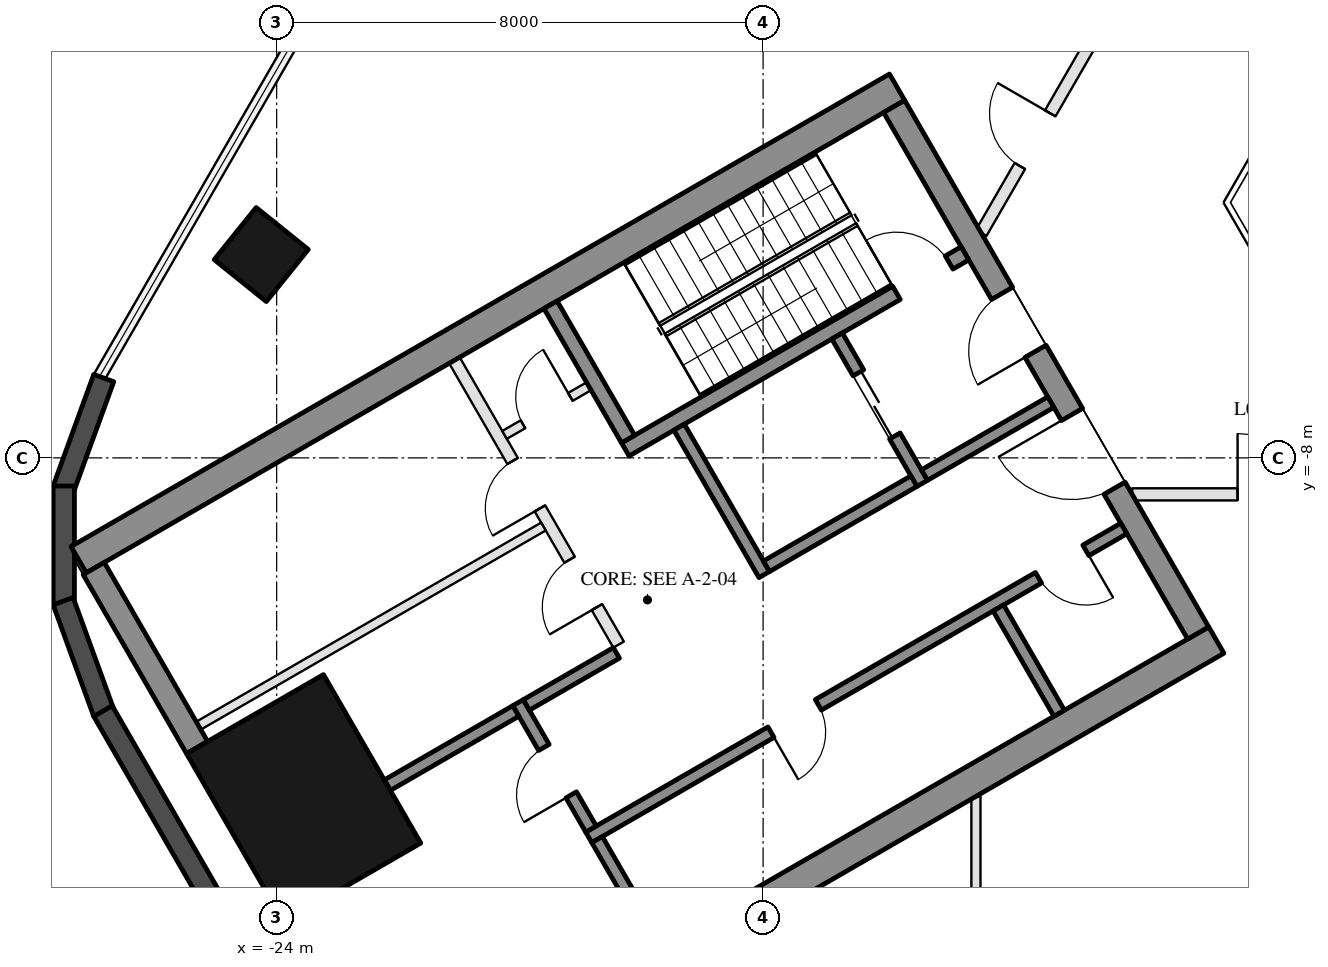
"""IFC4 building model, lengths in metres.
Left out: names, types, materials, properties, quantities, classifications, styles, units other than length and angle.
Written with IfcOpenShell. Run it as: python <this file> out.ifc"""

import sys

from ifc_helpers import new_model, si_unit, direction, frame, frame_2d, origin, origin_2d, place, context, subcontext, project, spatial, rectangle, hollow_rectangle, extrude, boolean, halfspace, element, fill, save


model = new_model("IFC4")
c1 = context("Model", 3, precision=1e-05, world=origin(), true_north=direction((0.0, 1.0)))
c2 = subcontext(c1, "Body", "Model", "MODEL_VIEW")
j1 = project(units=[si_unit("LENGTHUNIT", "METRE"), si_unit("PLANEANGLEUNIT", "RADIAN")], contexts=[c1])
p1 = place(None, origin())
s1 = spatial("IfcSite", under=j1, at=p1, CompositionType="ELEMENT")
p2 = place(p1, origin())
s2 = spatial("IfcBuilding", under=s1, at=p2, CompositionType="ELEMENT")
p3 = place(p2, frame((0.0, 0.0, 23.5)))
s3 = spatial("IfcBuildingStorey", under=s2, at=p3, CompositionType="ELEMENT", Elevation=23.5)
p4 = place(p3, frame((-24.253, -4.656, 0.0), z_axis=(0.066256812747, 0.010279549625, 0.997749650776), x_axis=(-0.498832862409, -0.865677791145, 0.042044468106)))
e1 = element("IfcColumn", 1, at=p4, inside=s3, PredefinedType="COLUMN", context=c2, shape_type="SweptSolid", body=[
    boolean("DIFFERENCE", boolean("DIFFERENCE", extrude(hollow_rectangle(XDim=1.1, YDim=1.1, WallThickness=0.05, at=origin_2d()), origin(), (0.0, 0.0, 1.0), 5.011), halfspace(frame((0.0, 0.0, 0.017), z_axis=(0.0, 0.0, 1.0), x_axis=(1.0, 0.0, 0.0)), True)), halfspace(frame((0.0, 0.0, 4.999), z_axis=(0.0, 0.0, 1.0), x_axis=(1.0, 0.0, 0.0)), False)),
])
p5 = place(p3, frame((-23.556, -13.6, 0.0), z_axis=(0.0, 0.0, 1.0), x_axis=(-0.5, 0.866025403784, 0.0)))
e2 = element("IfcColumn", 2, at=p5, inside=s3, PredefinedType="COLUMN", context=c2, shape_type="SweptSolid", body=[
    extrude(hollow_rectangle(XDim=3.2, YDim=2.6, WallThickness=0.08, at=origin_2d()), origin(), (0.0, 0.0, 1.0), 5.0),
])
for number, where, z_axis, x_axis in (
    (3, (-26.844, -6.687, 0.0), (0.0, 0.0, 1.0), (-0.342, -0.94, 0.0)),
    (4, (-27.501, -8.463, 0.0), (0.0, 0.0, 1.0), (0.0, -1.0, 0.0)),
    (5, (-27.512, -10.357, 0.0), (0.0, 0.0, 1.0), (0.342, -0.94, 0.0)),
):
    element("IfcWall", number, at=place(p3, frame(where, z_axis=z_axis, x_axis=x_axis)), inside=s3, PredefinedType="SOLIDWALL", context=c2, shape_type="SweptSolid", body=[
        extrude(rectangle(XDim=1.954, YDim=0.35, at=frame_2d((0.977, 0.0))), origin(), (0.0, 0.0, 1.0), 4.7),
    ])
p6 = place(p3, frame((-26.856, -12.165, 0.0), z_axis=(0.0, 0.0, 1.0), x_axis=(0.500009758026, -0.866019769912, 0.0)))
e6 = element("IfcWall", 6, at=p6, inside=s3, PredefinedType="SOLIDWALL", context=c2, shape_type="SweptSolid", body=[
    extrude(rectangle(XDim=5.787, YDim=0.35, at=frame_2d((2.893, 0.0))), origin(), (0.0, 0.0, 1.0), 4.7),
])
for number, where, z_axis, x_axis in (
    (7, (-13.797, -1.903, 0.0), (0.0, 0.0, 1.0), (-0.866, -0.5, 0.0)),
    (8, (-8.547, -10.997, 0.0), (0.0, 0.0, 1.0), (-0.866, -0.5, 0.0)),
):
    element("IfcWall", number, at=place(p3, frame(where, z_axis=z_axis, x_axis=x_axis)), inside=s3, PredefinedType="SHEAR", context=c2, shape_type="SweptSolid", body=[
        extrude(rectangle(XDim=15.542, YDim=0.5, at=frame_2d((7.771, 0.0))), origin(), (0.0, 0.0, 1.0), 4.7),
    ])
p7 = place(p3, frame((-13.845, -2.22, 0.0), z_axis=(0.0, 0.0, 1.0), x_axis=(0.500004234368, -0.866022959057, 0.0)))
e9 = element("IfcWall", 9, at=p7, inside=s3, PredefinedType="SHEAR", context=c2, shape_type="SweptSolid", body=[
    extrude(rectangle(XDim=10.0, YDim=0.4, at=frame_2d((5.0, 0.0))), origin(), (0.0, 0.0, 1.0), 4.7),
])
p8 = place(p7, frame((3.55, 0.0, 0.0)))
e10 = element("IfcOpeningElement", 10, at=p8, cuts=e9, PredefinedType="OPENING", context=c2, shape_type="SweptSolid", body=[
    extrude(rectangle(XDim=1.1, YDim=2.1, at=frame_2d((0.55, 1.05))), frame((0.0, 0.21, 0.0), z_axis=(0.0, -1.0, 0.0), x_axis=(1.0, 0.0, 0.0)), (0.0, 0.0, 1.0), 0.42),
])
p9 = place(p7, frame((5.85, 0.0, 0.0)))
e11 = element("IfcOpeningElement", 11, at=p9, cuts=e9, PredefinedType="OPENING", context=c2, shape_type="SweptSolid", body=[
    extrude(rectangle(XDim=1.4, YDim=2.1, at=frame_2d((0.7, 1.05))), frame((0.0, 0.21, 0.0), z_axis=(0.0, -1.0, 0.0), x_axis=(1.0, 0.0, 0.0)), (0.0, 0.0, 1.0), 0.42),
])
p10 = place(p3, frame((-27.009, -9.82, 0.0), z_axis=(0.0, 0.0, 1.0), x_axis=(0.499977295307, -0.866038511948, 0.0)))
e12 = element("IfcWall", 12, at=p10, inside=s3, PredefinedType="SHEAR", context=c2, shape_type="SweptSolid", body=[
    extrude(rectangle(XDim=3.4, YDim=0.4, at=frame_2d((1.7, 0.0))), origin(), (0.0, 0.0, 1.0), 4.7),
])
p11 = place(p3, frame((-12.681, -4.636, 0.0), z_axis=(0.0, 0.0, 1.0), x_axis=(-0.866021702275, -0.500006411147, 0.0)))
e13 = element("IfcWall", 13, at=p11, inside=s3, PredefinedType="SHEAR", context=c2, shape_type="SweptSolid", body=[
    extrude(rectangle(XDim=6.45, YDim=0.25, at=frame_2d((3.225, 0.0))), origin(), (0.0, 0.0, 1.0), 4.7),
])
p12 = place(p11, frame((0.3, 0.0, 0.0)))
e14 = element("IfcOpeningElement", 14, at=p12, cuts=e13, PredefinedType="OPENING", context=c2, shape_type="SweptSolid", body=[
    extrude(rectangle(XDim=1.0, YDim=2.1, at=frame_2d((0.5, 1.05))), frame((0.0, 0.135, 0.0), z_axis=(0.0, -1.0, 0.0), x_axis=(1.0, 0.0, 0.0)), (0.0, 0.0, 1.0), 0.27),
])
p13 = place(p3, frame((-19.496, -5.482, 0.0), z_axis=(0.0, 0.0, 1.0), x_axis=(0.499990435942, -0.866030925526, 0.0)))
e15 = element("IfcWall", 15, at=p13, inside=s3, PredefinedType="SHEAR", context=c2, shape_type="SweptSolid", body=[
    extrude(rectangle(XDim=2.55, YDim=0.25, at=frame_2d((1.275, 0.0))), origin(), (0.0, 0.0, 1.0), 4.7),
])
p14 = place(p3, frame((-17.381, -7.495, 0.0), z_axis=(0.0, 0.0, 1.0), x_axis=(0.500011755427, -0.866018616679, 0.0)))
e16 = element("IfcWall", 16, at=p14, inside=s3, PredefinedType="SHEAR", context=c2, shape_type="SweptSolid", body=[
    extrude(rectangle(XDim=2.8, YDim=0.2, at=frame_2d((1.4, 0.0))), origin(), (0.0, 0.0, 1.0), 4.7),
])
p15 = place(p3, frame((-14.783, -5.995, 0.0), z_axis=(0.0, 0.0, 1.0), x_axis=(0.49994636267, -0.866056369097, 0.0)))
e17 = element("IfcWall", 17, at=p15, inside=s3, PredefinedType="SHEAR", context=c2, shape_type="SweptSolid", body=[
    extrude(rectangle(XDim=2.8, YDim=0.2, at=frame_2d((1.4, 0.0))), origin(), (0.0, 0.0, 1.0), 4.7),
])
p16 = place(p15, frame((0.7, 0.0, 0.0)))
e18 = element("IfcOpeningElement", 18, at=p16, cuts=e17, PredefinedType="OPENING", context=c2, shape_type="SweptSolid", body=[
    extrude(rectangle(XDim=1.2, YDim=2.1, at=frame_2d((0.6, 1.05))), frame((0.0, 0.11, 0.0), z_axis=(0.0, -1.0, 0.0), x_axis=(1.0, 0.0, 0.0)), (0.0, 0.0, 1.0), 0.22),
])
p17 = place(p3, frame((-13.52, -8.383, 0.0), z_axis=(0.0, 0.0, 1.0), x_axis=(-0.866034573852, -0.49998411664, 0.0)))
e19 = element("IfcWall", 19, at=p17, inside=s3, PredefinedType="SHEAR", context=c2, shape_type="SweptSolid", body=[
    extrude(rectangle(XDim=2.8, YDim=0.2, at=frame_2d((1.4, 0.0))), origin(), (0.0, 0.0, 1.0), 4.7),
])
p18 = place(p3, frame((-11.268, -7.083, 0.0), z_axis=(0.0, 0.0, 1.0), x_axis=(-0.866050077142, -0.499957262057, 0.0)))
e20 = element("IfcWall", 20, at=p18, inside=s3, PredefinedType="SHEAR", context=c2, shape_type="SweptSolid", body=[
    extrude(rectangle(XDim=2.4, YDim=0.2, at=frame_2d((1.2, 0.0))), origin(), (0.0, 0.0, 1.0), 4.7),
])
p19 = place(p3, frame((-10.068, -9.162, 0.0), z_axis=(0.0, 0.0, 1.0), x_axis=(-0.866032725843, -0.499987317609, 0.0)))
e21 = element("IfcWall", 21, at=p19, inside=s3, PredefinedType="SHEAR", context=c2, shape_type="SweptSolid", body=[
    extrude(rectangle(XDim=10.16, YDim=0.2, at=frame_2d((5.08, 0.0))), origin(), (0.0, 0.0, 1.0), 4.7),
])
p20 = place(p19, frame((0.72, 0.0, 0.0)))
e22 = element("IfcOpeningElement", 22, at=p20, cuts=e21, PredefinedType="OPENING", context=c2, shape_type="SweptSolid", body=[
    extrude(rectangle(XDim=0.9, YDim=2.1, at=frame_2d((0.45, 1.05))), frame((0.0, 0.11, 0.0), z_axis=(0.0, -1.0, 0.0), x_axis=(1.0, 0.0, 0.0)), (0.0, 0.0, 1.0), 0.22),
])
p21 = place(p19, frame((5.8, 0.0, 0.0)))
e23 = element("IfcOpeningElement", 23, at=p21, cuts=e21, PredefinedType="OPENING", context=c2, shape_type="SweptSolid", body=[
    extrude(rectangle(XDim=0.9, YDim=2.1, at=frame_2d((0.45, 1.05))), frame((0.0, 0.11, 0.0), z_axis=(0.0, -1.0, 0.0), x_axis=(1.0, 0.0, 0.0)), (0.0, 0.0, 1.0), 0.22),
])
p22 = place(p3, frame((-20.031, -12.026, 0.0), z_axis=(0.0, 0.0, 1.0), x_axis=(0.500033551112, -0.866006032174, 0.0)))
e24 = element("IfcWall", 24, at=p22, inside=s3, PredefinedType="SHEAR", context=c2, shape_type="SweptSolid", body=[
    extrude(rectangle(XDim=2.4, YDim=0.2, at=frame_2d((1.2, 0.0))), origin(), (0.0, 0.0, 1.0), 4.7),
])
p23 = place(p22, frame((0.85, 0.0, 0.0)))
e25 = element("IfcOpeningElement", 25, at=p23, cuts=e24, PredefinedType="OPENING", context=c2, shape_type="SweptSolid", body=[
    extrude(rectangle(XDim=0.9, YDim=2.1, at=frame_2d((0.45, 1.05))), frame((0.0, 0.11, 0.0), z_axis=(0.0, -1.0, 0.0), x_axis=(1.0, 0.0, 0.0)), (0.0, 0.0, 1.0), 0.22),
])
p24 = place(p3, frame((-18.413, -11.208, 0.0), z_axis=(0.0, 0.0, 1.0), x_axis=(-0.866038183914, -0.499977863513, 0.0)))
e26 = element("IfcWall", 26, at=p24, inside=s3, PredefinedType="SHEAR", context=c2, shape_type="SweptSolid", body=[
    extrude(rectangle(XDim=1.71, YDim=0.2, at=frame_2d((0.855, 0.0))), origin(), (0.0, 0.0, 1.0), 4.7),
])
for number, where, z_axis, x_axis in (
    (27, (-12.131, -10.468, 0.0), (0.0, 0.0, 1.0), (0.5, -0.866, 0.0)),
    (28, (-18.73, -14.278, 0.0), (0.0, 0.0, 1.0), (0.5, -0.866, 0.0)),
):
    element("IfcWall", number, at=place(p3, frame(where, z_axis=z_axis, x_axis=x_axis)), inside=s3, PredefinedType="SHEAR", context=c2, shape_type="SweptSolid", body=[
        extrude(rectangle(XDim=2.0, YDim=0.2, at=frame_2d((1.0, 0.0))), origin(), (0.0, 0.0, 1.0), 4.7),
    ])
p25 = place(p3, frame((-20.067, -12.163, 0.0), z_axis=(0.0, 0.0, 1.0), x_axis=(-0.866048967903, -0.499959183527, 0.0)))
e29 = element("IfcWall", 29, at=p25, inside=s3, PredefinedType="SHEAR", context=c2, shape_type="SweptSolid", body=[
    extrude(rectangle(XDim=2.44, YDim=0.2, at=frame_2d((1.22, 0.0))), origin(), (0.0, 0.0, 1.0), 4.7),
])
p26 = place(p3, frame((-21.076, -6.395, 0.0), z_axis=(0.0, 0.0, 1.0), x_axis=(0.50001468107, -0.866016927499, 0.0)))
e30 = element("IfcWall", 30, at=p26, inside=s3, PredefinedType="PARTITIONING", context=c2, shape_type="SweptSolid", body=[
    extrude(rectangle(XDim=5.4, YDim=0.2, at=frame_2d((2.7, 0.0))), origin(), (0.0, 0.0, 1.0), 4.7),
])
p27 = place(p26, frame((1.913, 0.0, 0.0)))
e31 = element("IfcOpeningElement", 31, at=p27, cuts=e30, PredefinedType="OPENING", context=c2, shape_type="SweptSolid", body=[
    extrude(rectangle(XDim=0.9, YDim=2.1, at=frame_2d((0.45, 1.05))), frame((0.0, 0.11, 0.0), z_axis=(0.0, -1.0, 0.0), x_axis=(1.0, 0.0, 0.0)), (0.0, 0.0, 1.0), 0.22),
])
p28 = place(p26, frame((3.788, 0.0, 0.0)))
e32 = element("IfcOpeningElement", 32, at=p28, cuts=e30, PredefinedType="OPENING", context=c2, shape_type="SweptSolid", body=[
    extrude(rectangle(XDim=0.9, YDim=2.1, at=frame_2d((0.45, 1.05))), frame((0.0, 0.11, 0.0), z_axis=(0.0, -1.0, 0.0), x_axis=(1.0, 0.0, 0.0)), (0.0, 0.0, 1.0), 0.22),
])
p29 = place(p3, frame((-18.866, -6.822, 0.0), z_axis=(0.0, 0.0, 1.0), x_axis=(-0.866028054938, -0.499995408039, 0.0)))
e33 = element("IfcWall", 33, at=p29, inside=s3, PredefinedType="PARTITIONING", context=c2, shape_type="SweptSolid", body=[
    extrude(rectangle(XDim=1.6, YDim=0.15, at=frame_2d((0.8, 0.0))), origin(), (0.0, 0.0, 1.0), 4.7),
])
p30 = place(p29, frame((0.35, 0.0, 0.0)))
e34 = element("IfcOpeningElement", 34, at=p30, cuts=e33, PredefinedType="OPENING", context=c2, shape_type="SweptSolid", body=[
    extrude(rectangle(XDim=0.9, YDim=2.1, at=frame_2d((0.45, 1.05))), frame((0.0, 0.085, 0.0), z_axis=(0.0, -1.0, 0.0), x_axis=(1.0, 0.0, 0.0)), (0.0, 0.0, 1.0), 0.17),
])
p31 = place(p3, frame((-19.613, -9.13, 0.0), z_axis=(0.0, 0.0, 1.0), x_axis=(-0.866037242061, -0.499979494943, 0.0)))
e35 = element("IfcWall", 35, at=p31, inside=s3, PredefinedType="PARTITIONING", context=c2, shape_type="SweptSolid", body=[
    extrude(rectangle(XDim=6.55, YDim=0.15, at=frame_2d((3.275, 0.0))), origin(), (0.0, 0.0, 1.0), 4.7),
])
p32 = place(p3, frame((-12.5, -19.876, 0.0), z_axis=(0.0, 0.0, 1.0), x_axis=(0.0, 1.0, 0.0)))
e36 = element("IfcWall", 36, at=p32, inside=s3, PredefinedType="PARTITIONING", context=c2, shape_type="SweptSolid", body=[
    extrude(rectangle(XDim=6.308, YDim=0.15, at=frame_2d((3.154, 0.0))), origin(), (0.0, 0.0, 1.0), 4.1),
])
p33 = place(p32, frame((2.704, 0.0, 0.0)))
e37 = element("IfcOpeningElement", 37, at=p33, cuts=e36, PredefinedType="OPENING", context=c2, shape_type="SweptSolid", body=[
    extrude(rectangle(XDim=0.9, YDim=2.1, at=frame_2d((0.45, 1.05))), frame((0.0, 0.085, 0.0), z_axis=(0.0, -1.0, 0.0), x_axis=(1.0, 0.0, 0.0)), (0.0, 0.0, 1.0), 0.17),
])
p34 = place(p3, frame((-9.93, -8.6, 0.0), z_axis=(0.0, 0.0, 1.0), x_axis=(1.0, 0.0, 0.0)))
e38 = element("IfcWall", 38, at=p34, inside=s3, PredefinedType="PARTITIONING", context=c2, shape_type="SweptSolid", body=[
    extrude(rectangle(XDim=19.861, YDim=0.2, at=frame_2d((9.93, 0.0))), origin(), (0.0, 0.0, 1.0), 3.91),
])
p35 = place(p34, frame((1.734, 0.0, 0.0)))
e39 = element("IfcOpeningElement", 39, at=p35, cuts=e38, PredefinedType="OPENING", context=c2, shape_type="SweptSolid", body=[
    extrude(rectangle(XDim=1.0, YDim=2.1, at=frame_2d((0.5, 1.05))), frame((0.0, 0.11, 0.0), z_axis=(0.0, -1.0, 0.0), x_axis=(1.0, 0.0, 0.0)), (0.0, 0.0, 1.0), 0.22),
])
p36 = place(p34, frame((6.081, 0.0, 0.0)))
e40 = element("IfcOpeningElement", 40, at=p36, cuts=e38, PredefinedType="OPENING", context=c2, shape_type="SweptSolid", body=[
    extrude(rectangle(XDim=1.0, YDim=2.1, at=frame_2d((0.5, 1.05))), frame((0.0, 0.11, 0.0), z_axis=(0.0, -1.0, 0.0), x_axis=(1.0, 0.0, 0.0)), (0.0, 0.0, 1.0), 0.22),
])
p37 = place(p34, frame((10.831, 0.0, 0.0)))
e41 = element("IfcOpeningElement", 41, at=p37, cuts=e38, PredefinedType="OPENING", context=c2, shape_type="SweptSolid", body=[
    extrude(rectangle(XDim=1.0, YDim=2.1, at=frame_2d((0.5, 1.05))), frame((0.0, 0.11, 0.0), z_axis=(0.0, -1.0, 0.0), x_axis=(1.0, 0.0, 0.0)), (0.0, 0.0, 1.0), 0.22),
])
p38 = place(p34, frame((16.278, 0.0, 0.0)))
e42 = element("IfcOpeningElement", 42, at=p38, cuts=e38, PredefinedType="OPENING", context=c2, shape_type="SweptSolid", body=[
    extrude(rectangle(XDim=1.2, YDim=2.1, at=frame_2d((0.6, 1.05))), frame((0.0, 0.11, 0.0), z_axis=(0.0, -1.0, 0.0), x_axis=(1.0, 0.0, 0.0)), (0.0, 0.0, 1.0), 0.22),
])
p39 = place(p3, frame((-2.482, 12.9, 0.0), z_axis=(0.0, 0.0, 1.0), x_axis=(-0.50000478328, -0.866022642139, 0.0)))
e43 = element("IfcWall", 43, at=p39, inside=s3, PredefinedType="PARTITIONING", context=c2, shape_type="SweptSolid", body=[
    extrude(rectangle(XDim=19.861, YDim=0.2, at=frame_2d((9.931, 0.0))), origin(), (0.0, 0.0, 1.0), 3.91),
])
p40 = place(p39, frame((13.23, 0.0, 0.0)))
e44 = element("IfcOpeningElement", 44, at=p40, cuts=e43, PredefinedType="OPENING", context=c2, shape_type="SweptSolid", body=[
    extrude(rectangle(XDim=1.8, YDim=2.1, at=frame_2d((0.9, 1.05))), frame((0.0, 0.11, 0.0), z_axis=(0.0, -1.0, 0.0), x_axis=(1.0, 0.0, 0.0)), (0.0, 0.0, 1.0), 0.22),
])
p41 = place(p39, frame((2.234, 0.0, 0.0)))
e45 = element("IfcOpeningElement", 45, at=p41, cuts=e43, PredefinedType="OPENING", context=c2, shape_type="SweptSolid", body=[
    extrude(rectangle(XDim=1.0, YDim=2.1, at=frame_2d((0.5, 1.05))), frame((0.0, 0.11, 0.0), z_axis=(0.0, -1.0, 0.0), x_axis=(1.0, 0.0, 0.0)), (0.0, 0.0, 1.0), 0.22),
])
p42 = place(p39, frame((6.706, 0.0, 0.0)))
e46 = element("IfcOpeningElement", 46, at=p42, cuts=e43, PredefinedType="OPENING", context=c2, shape_type="SweptSolid", body=[
    extrude(rectangle(XDim=1.0, YDim=2.1, at=frame_2d((0.5, 1.05))), frame((0.0, 0.11, 0.0), z_axis=(0.0, -1.0, 0.0), x_axis=(1.0, 0.0, 0.0)), (0.0, 0.0, 1.0), 0.22),
])
p43 = place(p39, frame((9.943, 0.0, 0.0)))
e47 = element("IfcOpeningElement", 47, at=p43, cuts=e43, PredefinedType="OPENING", context=c2, shape_type="SweptSolid", body=[
    extrude(rectangle(XDim=1.0, YDim=2.1, at=frame_2d((0.5, 1.05))), frame((0.0, 0.11, 0.0), z_axis=(0.0, -1.0, 0.0), x_axis=(1.0, 0.0, 0.0)), (0.0, 0.0, 1.0), 0.22),
])
p44 = place(p39, frame((17.59, 0.0, 0.0)))
e48 = element("IfcOpeningElement", 48, at=p44, cuts=e43, PredefinedType="OPENING", context=c2, shape_type="SweptSolid", body=[
    extrude(rectangle(XDim=1.0, YDim=2.1, at=frame_2d((0.5, 1.05))), frame((0.0, 0.11, 0.0), z_axis=(0.0, -1.0, 0.0), x_axis=(1.0, 0.0, 0.0)), (0.0, 0.0, 1.0), 0.22),
])
p45 = place(p16, origin())
e49 = element("IfcDoor", 49, at=p45, inside=s3, OperationType="DOUBLE_DOOR_SLIDING", PredefinedType="DOOR", context=c2, shape_type="SweptSolid", body=[
    extrude(rectangle(XDim=1.2, YDim=2.1, at=frame_2d((0.6, 1.05))), frame((0.0, 0.025, 0.0), z_axis=(0.0, -1.0, 0.0), x_axis=(1.0, 0.0, 0.0)), (0.0, 0.0, 1.0), 0.05),
])
fill(e18, e49)
p46 = place(p30, frame((0.9, 0.0, 0.0), z_axis=(0.0, 0.0, 1.0), x_axis=(-1.0, 0.0, 0.0)))
e50 = element("IfcDoor", 50, at=p46, inside=s3, OperationType="SINGLE_SWING_RIGHT", PredefinedType="DOOR", context=c2, shape_type="SweptSolid", body=[
    extrude(rectangle(XDim=0.9, YDim=2.1, at=frame_2d((0.45, 1.05))), frame((0.0, 0.025, 0.0), z_axis=(0.0, -1.0, 0.0), x_axis=(1.0, 0.0, 0.0)), (0.0, 0.0, 1.0), 0.05),
])
fill(e34, e50)
p47 = place(p20, origin())
e51 = element("IfcDoor", 51, at=p47, inside=s3, OperationType="SINGLE_SWING_LEFT", PredefinedType="DOOR", context=c2, shape_type="SweptSolid", body=[
    extrude(rectangle(XDim=0.9, YDim=2.1, at=frame_2d((0.45, 1.05))), frame((0.0, 0.025, 0.0), z_axis=(0.0, -1.0, 0.0), x_axis=(1.0, 0.0, 0.0)), (0.0, 0.0, 1.0), 0.05),
])
fill(e22, e51)
p48 = place(p21, origin())
e52 = element("IfcDoor", 52, at=p48, inside=s3, OperationType="SINGLE_SWING_RIGHT", PredefinedType="DOOR", context=c2, shape_type="SweptSolid", body=[
    extrude(rectangle(XDim=0.9, YDim=2.1, at=frame_2d((0.45, 1.05))), frame((0.0, 0.025, 0.0), z_axis=(0.0, -1.0, 0.0), x_axis=(1.0, 0.0, 0.0)), (0.0, 0.0, 1.0), 0.05),
])
fill(e23, e52)
p49 = place(p23, frame((0.9, 0.0, 0.0), z_axis=(0.0, 0.0, 1.0), x_axis=(-1.0, 0.0, 0.0)))
e53 = element("IfcDoor", 53, at=p49, inside=s3, OperationType="SINGLE_SWING_LEFT", PredefinedType="DOOR", context=c2, shape_type="SweptSolid", body=[
    extrude(rectangle(XDim=0.9, YDim=2.1, at=frame_2d((0.45, 1.05))), frame((0.0, 0.025, 0.0), z_axis=(0.0, -1.0, 0.0), x_axis=(1.0, 0.0, 0.0)), (0.0, 0.0, 1.0), 0.05),
])
fill(e25, e53)
p50 = place(p27, frame((0.9, 0.0, 0.0), z_axis=(0.0, 0.0, 1.0), x_axis=(-1.0, 0.0, 0.0)))
e54 = element("IfcDoor", 54, at=p50, inside=s3, OperationType="SINGLE_SWING_LEFT", PredefinedType="DOOR", context=c2, shape_type="SweptSolid", body=[
    extrude(rectangle(XDim=0.9, YDim=2.1, at=frame_2d((0.45, 1.05))), frame((0.0, 0.025, 0.0), z_axis=(0.0, -1.0, 0.0), x_axis=(1.0, 0.0, 0.0)), (0.0, 0.0, 1.0), 0.05),
])
fill(e31, e54)
p51 = place(p28, frame((0.9, 0.0, 0.0), z_axis=(0.0, 0.0, 1.0), x_axis=(-1.0, 0.0, 0.0)))
e55 = element("IfcDoor", 55, at=p51, inside=s3, OperationType="SINGLE_SWING_LEFT", PredefinedType="DOOR", context=c2, shape_type="SweptSolid", body=[
    extrude(rectangle(XDim=0.9, YDim=2.1, at=frame_2d((0.45, 1.05))), frame((0.0, 0.025, 0.0), z_axis=(0.0, -1.0, 0.0), x_axis=(1.0, 0.0, 0.0)), (0.0, 0.0, 1.0), 0.05),
])
fill(e32, e55)
p52 = place(p8, frame((1.1, 0.0, 0.0), z_axis=(0.0, 0.0, 1.0), x_axis=(-1.0, 0.0, 0.0)))
e56 = element("IfcDoor", 56, at=p52, inside=s3, OperationType="SINGLE_SWING_LEFT", PredefinedType="DOOR", context=c2, shape_type="SweptSolid", body=[
    extrude(rectangle(XDim=1.1, YDim=2.1, at=frame_2d((0.55, 1.05))), frame((0.0, 0.025, 0.0), z_axis=(0.0, -1.0, 0.0), x_axis=(1.0, 0.0, 0.0)), (0.0, 0.0, 1.0), 0.05),
])
fill(e10, e56)
p53 = place(p9, frame((1.4, 0.0, 0.0), z_axis=(0.0, 0.0, 1.0), x_axis=(-1.0, 0.0, 0.0)))
e57 = element("IfcDoor", 57, at=p53, inside=s3, OperationType="DOUBLE_DOOR_SINGLE_SWING", PredefinedType="DOOR", context=c2, shape_type="SweptSolid", body=[
    extrude(rectangle(XDim=1.4, YDim=2.1, at=frame_2d((0.7, 1.05))), frame((0.0, 0.025, 0.0), z_axis=(0.0, -1.0, 0.0), x_axis=(1.0, 0.0, 0.0)), (0.0, 0.0, 1.0), 0.05),
])
fill(e11, e57)
p54 = place(p12, frame((1.0, 0.0, 0.0), z_axis=(0.0, 0.0, 1.0), x_axis=(-1.0, 0.0, 0.0)))
e58 = element("IfcDoor", 58, at=p54, inside=s3, OperationType="SINGLE_SWING_LEFT", PredefinedType="DOOR", context=c2, shape_type="SweptSolid", body=[
    extrude(rectangle(XDim=1.0, YDim=2.1, at=frame_2d((0.5, 1.05))), frame((0.0, 0.025, 0.0), z_axis=(0.0, -1.0, 0.0), x_axis=(1.0, 0.0, 0.0)), (0.0, 0.0, 1.0), 0.05),
])
fill(e14, e58)
p55 = place(p35, origin())
e59 = element("IfcDoor", 59, at=p55, inside=s3, OperationType="SINGLE_SWING_LEFT", PredefinedType="DOOR", context=c2, shape_type="SweptSolid", body=[
    extrude(rectangle(XDim=1.0, YDim=2.1, at=frame_2d((0.5, 1.05))), frame((0.0, 0.025, 0.0), z_axis=(0.0, -1.0, 0.0), x_axis=(1.0, 0.0, 0.0)), (0.0, 0.0, 1.0), 0.05),
])
fill(e39, e59)
p56 = place(p44, frame((1.0, 0.0, 0.0), z_axis=(0.0, 0.0, 1.0), x_axis=(-1.0, 0.0, 0.0)))
e60 = element("IfcDoor", 60, at=p56, inside=s3, OperationType="SINGLE_SWING_RIGHT", PredefinedType="DOOR", context=c2, shape_type="SweptSolid", body=[
    extrude(rectangle(XDim=1.0, YDim=2.1, at=frame_2d((0.5, 1.05))), frame((0.0, 0.025, 0.0), z_axis=(0.0, -1.0, 0.0), x_axis=(1.0, 0.0, 0.0)), (0.0, 0.0, 1.0), 0.05),
])
fill(e48, e60)
save(model, sys.argv[1])
